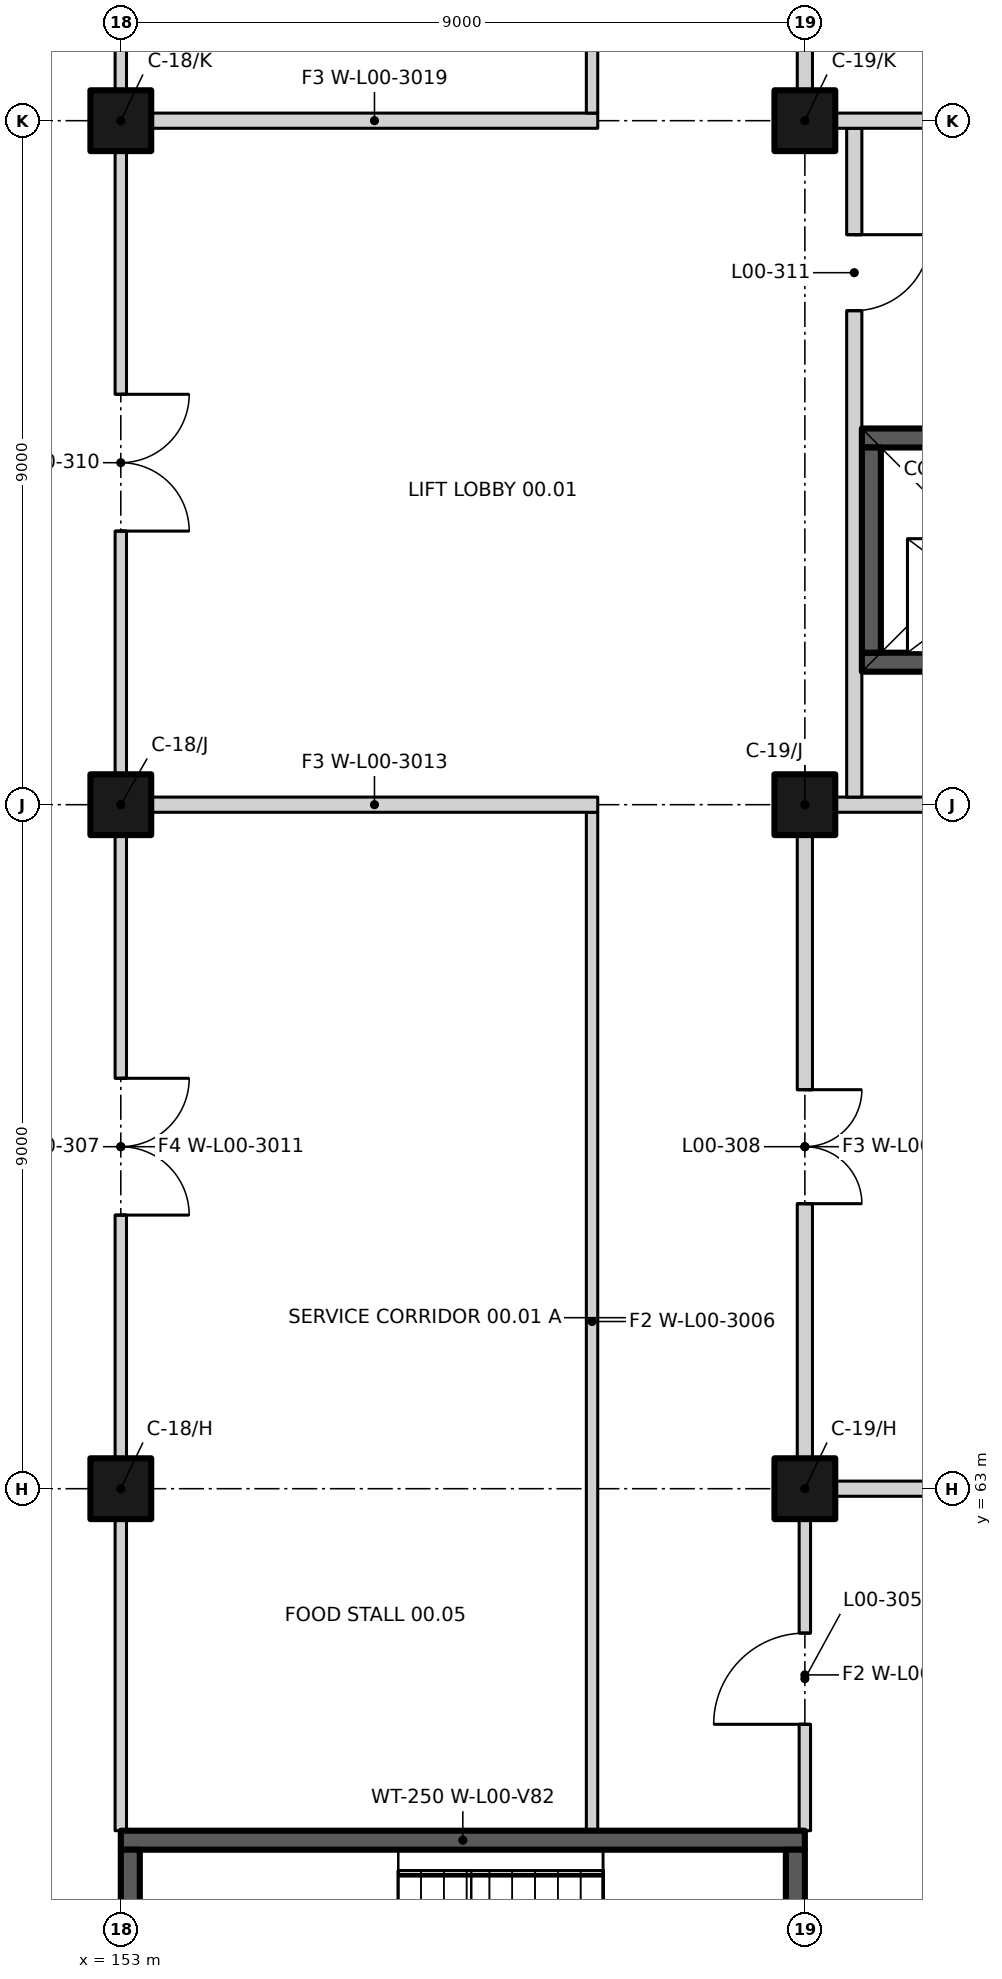
"""IFC4 building model, lengths in metres.
Left out: names, types, materials, properties, quantities, classifications, styles, units other than length and angle.
Written with IfcOpenShell. Run it as: python <this file> out.ifc"""

import sys

from ifc_helpers import new_model, si_unit, direction, frame, frame_2d, origin, origin_2d, place, context, subcontext, project, spatial, rectangle, extrude, element, fill, save


model = new_model("IFC4")
c1 = context("Model", 3, precision=1e-05, world=origin(), true_north=direction((0.0, 1.0)))
c2 = subcontext(c1, "Body", "Model", "MODEL_VIEW")
j1 = project(units=[si_unit("LENGTHUNIT", "METRE"), si_unit("PLANEANGLEUNIT", "RADIAN")], contexts=[c1])
p1 = place(None, origin())
s1 = spatial("IfcSite", under=j1, at=p1, CompositionType="ELEMENT")
p2 = place(p1, origin())
s2 = spatial("IfcBuilding", under=s1, at=p2, CompositionType="ELEMENT")
p3 = place(p2, origin())
s3 = spatial("IfcBuildingStorey", under=s2, at=p3, CompositionType="ELEMENT", Elevation=0.0)
for number, where, z_axis, x_axis in (
    (1, (153.0, 63.0, 0.0), (0.0, 0.0, 1.0), (1.0, 0.0, 0.0)),
    (2, (162.0, 63.0, 0.0), (0.0, 0.0, 1.0), (1.0, 0.0, 0.0)),
    (3, (153.0, 72.0, 0.0), (0.0, 0.0, 1.0), (1.0, 0.0, 0.0)),
    (4, (162.0, 72.0, 0.0), (0.0, 0.0, 1.0), (1.0, 0.0, 0.0)),
    (5, (153.0, 81.0, 0.0), (0.0, 0.0, 1.0), (1.0, 0.0, 0.0)),
    (6, (162.0, 81.0, 0.0), (0.0, 0.0, 1.0), (1.0, 0.0, 0.0)),
):
    element("IfcColumn", number, at=place(p3, frame(where, z_axis=z_axis, x_axis=x_axis)), inside=s3, PredefinedType="COLUMN", context=c2, shape_type="SweptSolid", body=[
        extrude(rectangle(XDim=0.8, YDim=0.8, at=origin_2d()), origin(), (0.0, 0.0, 1.0), 6.0),
    ])
p4 = place(p3, frame((153.0, 58.375, 0.0), z_axis=(0.0, 0.0, 1.0), x_axis=(1.0, 0.0, 0.0)))
e7 = element("IfcWall", 7, at=p4, inside=s3, PredefinedType="SHEAR", context=c2, shape_type="SweptSolid", body=[
    extrude(rectangle(XDim=9.0, YDim=0.25, at=frame_2d((4.5, 0.0))), origin(), (0.0, 0.0, 1.0), 6.0),
])
p5 = place(p3, frame((153.125, 56.188, 0.0), z_axis=(0.0, 0.0, 1.0), x_axis=(0.0, 1.0, 0.0)))
e8 = element("IfcWall", 8, at=p5, inside=s3, PredefinedType="SHEAR", context=c2, shape_type="SweptSolid", body=[
    extrude(rectangle(XDim=2.062, YDim=0.25, at=frame_2d((1.031, 0.0))), origin(), (0.0, 0.0, 1.0), 6.0),
])
p6 = place(p3, frame((161.875, 54.4, 0.0), z_axis=(0.0, 0.0, 1.0), x_axis=(0.0, 1.0, 0.0)))
e9 = element("IfcWall", 9, at=p6, inside=s3, PredefinedType="SHEAR", context=c2, shape_type="SweptSolid", body=[
    extrude(rectangle(XDim=3.85, YDim=0.25, at=frame_2d((1.925, 0.0))), origin(), (0.0, 0.0, 1.0), 6.0),
])
p7 = place(p6, frame((0.95, 0.0, 0.0)))
e10 = element("IfcOpeningElement", 10, at=p7, cuts=e9, PredefinedType="OPENING", context=c2, shape_type="SweptSolid", body=[
    extrude(rectangle(XDim=1.8, YDim=2.1, at=frame_2d((0.9, 1.05))), frame((0.0, 0.135, 0.0), z_axis=(0.0, -1.0, 0.0), x_axis=(1.0, 0.0, 0.0)), (0.0, 0.0, 1.0), 0.27),
])
p8 = place(p3, frame((162.75, 73.875, -1.6), z_axis=(0.0, 0.0, 1.0), x_axis=(1.0, 0.0, 0.0)))
e11 = element("IfcWall", 11, at=p8, inside=s3, PredefinedType="SHEAR", context=c2, shape_type="SweptSolid", body=[
    extrude(rectangle(XDim=3.2, YDim=0.25, at=frame_2d((1.6, 0.0))), origin(), (0.0, 0.0, 1.0), 7.6),
])
p9 = place(p8, frame((1.05, 0.0, 1.6)))
e12 = element("IfcOpeningElement", 12, at=p9, cuts=e11, PredefinedType="OPENING", context=c2, shape_type="SweptSolid", body=[
    extrude(rectangle(XDim=1.1, YDim=2.1, at=frame_2d((0.55, 1.05))), frame((0.0, 0.135, 0.0), z_axis=(0.0, -1.0, 0.0), x_axis=(1.0, 0.0, 0.0)), (0.0, 0.0, 1.0), 0.27),
])
p10 = place(p3, frame((162.75, 76.825, -1.6), z_axis=(0.0, 0.0, 1.0), x_axis=(1.0, 0.0, 0.0)))
e13 = element("IfcWall", 13, at=p10, inside=s3, PredefinedType="SHEAR", context=c2, shape_type="SweptSolid", body=[
    extrude(rectangle(XDim=3.2, YDim=0.25, at=frame_2d((1.6, 0.0))), origin(), (0.0, 0.0, 1.0), 7.6),
])
p11 = place(p3, frame((162.875, 74.0, -1.6), z_axis=(0.0, 0.0, 1.0), x_axis=(0.0, 1.0, 0.0)))
e14 = element("IfcWall", 14, at=p11, inside=s3, PredefinedType="SHEAR", context=c2, shape_type="SweptSolid", body=[
    extrude(rectangle(XDim=2.7, YDim=0.25, at=frame_2d((1.35, 0.0))), origin(), (0.0, 0.0, 1.0), 7.6),
])
p12 = place(p3, frame((153.0, 58.5, 0.0), z_axis=(0.0, 0.0, 1.0), x_axis=(0.0, 1.0, 0.0)))
e15 = element("IfcWall", 15, at=p12, inside=s3, PredefinedType="PARTITIONING", context=c2, shape_type="SweptSolid", body=[
    extrude(rectangle(XDim=4.1, YDim=0.15, at=frame_2d((2.05, 0.0))), origin(), (0.0, 0.0, 1.0), 5.7),
])
p13 = place(p3, frame((159.2, 58.5, 0.0), z_axis=(0.0, 0.0, 1.0), x_axis=(0.0, 1.0, 0.0)))
e16 = element("IfcWall", 16, at=p13, inside=s3, PredefinedType="PARTITIONING", context=c2, shape_type="SweptSolid", body=[
    extrude(rectangle(XDim=13.4, YDim=0.15, at=frame_2d((6.7, 0.0))), origin(), (0.0, 0.0, 1.0), 5.7),
])
p14 = place(p3, frame((162.0, 58.5, 0.0), z_axis=(0.0, 0.0, 1.0), x_axis=(0.0, 1.0, 0.0)))
e17 = element("IfcWall", 17, at=p14, inside=s3, PredefinedType="PARTITIONING", context=c2, shape_type="SweptSolid", body=[
    extrude(rectangle(XDim=4.1, YDim=0.15, at=frame_2d((2.05, 0.0))), origin(), (0.0, 0.0, 1.0), 5.7),
])
p15 = place(p14, frame((1.4, 0.0, 0.0)))
e18 = element("IfcOpeningElement", 18, at=p15, cuts=e17, PredefinedType="OPENING", context=c2, shape_type="SweptSolid", body=[
    extrude(rectangle(XDim=1.2, YDim=2.1, at=frame_2d((0.6, 1.05))), frame((0.0, 0.085, 0.0), z_axis=(0.0, -1.0, 0.0), x_axis=(1.0, 0.0, 0.0)), (0.0, 0.0, 1.0), 0.17),
])
p16 = place(p3, frame((162.4, 63.0, 0.0), z_axis=(0.0, 0.0, 1.0), x_axis=(1.0, 0.0, 0.0)))
e19 = element("IfcWall", 19, at=p16, inside=s3, PredefinedType="PARTITIONING", context=c2, shape_type="SweptSolid", body=[
    extrude(rectangle(XDim=8.2, YDim=0.2, at=frame_2d((4.1, 0.0))), origin(), (0.0, 0.0, 1.0), 5.7),
])
p17 = place(p3, frame((153.0, 63.4, 0.0), z_axis=(0.0, 0.0, 1.0), x_axis=(0.0, 1.0, 0.0)))
e20 = element("IfcWall", 20, at=p17, inside=s3, PredefinedType="PARTITIONING", context=c2, shape_type="SweptSolid", body=[
    extrude(rectangle(XDim=8.2, YDim=0.15, at=frame_2d((4.1, 0.0))), origin(), (0.0, 0.0, 1.0), 5.2),
])
p18 = place(p17, frame((5.0, 0.0, 0.0), z_axis=(0.0, 0.0, 1.0), x_axis=(-1.0, 0.0, 0.0)))
e21 = element("IfcOpeningElement", 21, at=p18, cuts=e20, PredefinedType="OPENING", context=c2, shape_type="SweptSolid", body=[
    extrude(rectangle(XDim=1.8, YDim=2.1, at=frame_2d((0.9, 1.05))), frame((0.0, 0.085, 0.0), z_axis=(0.0, -1.0, 0.0), x_axis=(1.0, 0.0, 0.0)), (0.0, 0.0, 1.0), 0.17),
])
p19 = place(p3, frame((162.0, 63.4, 0.0), z_axis=(0.0, 0.0, 1.0), x_axis=(0.0, 1.0, 0.0)))
e22 = element("IfcWall", 22, at=p19, inside=s3, PredefinedType="PARTITIONING", context=c2, shape_type="SweptSolid", body=[
    extrude(rectangle(XDim=8.2, YDim=0.2, at=frame_2d((4.1, 0.0))), origin(), (0.0, 0.0, 1.0), 5.7),
])
p20 = place(p19, frame((4.85, 0.0, 0.0), z_axis=(0.0, 0.0, 1.0), x_axis=(-1.0, 0.0, 0.0)))
e23 = element("IfcOpeningElement", 23, at=p20, cuts=e22, PredefinedType="OPENING", context=c2, shape_type="SweptSolid", body=[
    extrude(rectangle(XDim=1.5, YDim=2.4, at=frame_2d((0.75, 1.2))), frame((0.0, 0.11, 0.0), z_axis=(0.0, -1.0, 0.0), x_axis=(1.0, 0.0, 0.0)), (0.0, 0.0, 1.0), 0.22),
])
p21 = place(p3, frame((153.4, 72.0, 0.0), z_axis=(0.0, 0.0, 1.0), x_axis=(1.0, 0.0, 0.0)))
e24 = element("IfcWall", 24, at=p21, inside=s3, PredefinedType="PARTITIONING", context=c2, shape_type="SweptSolid", body=[
    extrude(rectangle(XDim=5.875, YDim=0.2, at=frame_2d((2.938, 0.0))), origin(), (0.0, 0.0, 1.0), 5.7),
])
p22 = place(p3, frame((162.4, 72.0, 0.0), z_axis=(0.0, 0.0, 1.0), x_axis=(1.0, 0.0, 0.0)))
e25 = element("IfcWall", 25, at=p22, inside=s3, PredefinedType="PARTITIONING", context=c2, shape_type="SweptSolid", body=[
    extrude(rectangle(XDim=8.2, YDim=0.2, at=frame_2d((4.1, 0.0))), origin(), (0.0, 0.0, 1.0), 5.2),
])
p23 = place(p3, frame((162.65, 72.1, 0.0), z_axis=(0.0, 0.0, 1.0), x_axis=(0.0, 1.0, 0.0)))
e26 = element("IfcWall", 26, at=p23, inside=s3, PredefinedType="PARTITIONING", context=c2, shape_type="SweptSolid", body=[
    extrude(rectangle(XDim=8.8, YDim=0.2, at=frame_2d((4.4, 0.0))), origin(), (0.0, 0.0, 1.0), 5.2),
])
p24 = place(p23, frame((7.4, 0.0, 0.0), z_axis=(0.0, 0.0, 1.0), x_axis=(-1.0, 0.0, 0.0)))
e27 = element("IfcOpeningElement", 27, at=p24, cuts=e26, PredefinedType="OPENING", context=c2, shape_type="SweptSolid", body=[
    extrude(rectangle(XDim=1.0, YDim=2.1, at=frame_2d((0.5, 1.05))), frame((0.0, 0.11, 0.0), z_axis=(0.0, -1.0, 0.0), x_axis=(1.0, 0.0, 0.0)), (0.0, 0.0, 1.0), 0.22),
])
p25 = place(p3, frame((153.0, 72.4, 0.0), z_axis=(0.0, 0.0, 1.0), x_axis=(0.0, 1.0, 0.0)))
e28 = element("IfcWall", 28, at=p25, inside=s3, PredefinedType="PARTITIONING", context=c2, shape_type="SweptSolid", body=[
    extrude(rectangle(XDim=8.2, YDim=0.15, at=frame_2d((4.1, 0.0))), origin(), (0.0, 0.0, 1.0), 5.2),
])
p26 = place(p25, frame((5.0, 0.0, 0.0), z_axis=(0.0, 0.0, 1.0), x_axis=(-1.0, 0.0, 0.0)))
e29 = element("IfcOpeningElement", 29, at=p26, cuts=e28, PredefinedType="OPENING", context=c2, shape_type="SweptSolid", body=[
    extrude(rectangle(XDim=1.8, YDim=2.1, at=frame_2d((0.9, 1.05))), frame((0.0, 0.085, 0.0), z_axis=(0.0, -1.0, 0.0), x_axis=(1.0, 0.0, 0.0)), (0.0, 0.0, 1.0), 0.17),
])
p27 = place(p3, frame((153.4, 81.0, 0.0), z_axis=(0.0, 0.0, 1.0), x_axis=(1.0, 0.0, 0.0)))
e30 = element("IfcWall", 30, at=p27, inside=s3, PredefinedType="PARTITIONING", context=c2, shape_type="SweptSolid", body=[
    extrude(rectangle(XDim=5.875, YDim=0.2, at=frame_2d((2.938, 0.0))), origin(), (0.0, 0.0, 1.0), 5.7),
])
p28 = place(p3, frame((162.4, 81.0, 0.0), z_axis=(0.0, 0.0, 1.0), x_axis=(1.0, 0.0, 0.0)))
e31 = element("IfcWall", 31, at=p28, inside=s3, PredefinedType="PARTITIONING", context=c2, shape_type="SweptSolid", body=[
    extrude(rectangle(XDim=8.2, YDim=0.2, at=frame_2d((4.1, 0.0))), origin(), (0.0, 0.0, 1.0), 5.2),
])
p29 = place(p3, frame((159.2, 81.1, 0.0), z_axis=(0.0, 0.0, 1.0), x_axis=(0.0, 1.0, 0.0)))
e32 = element("IfcWall", 32, at=p29, inside=s3, PredefinedType="PARTITIONING", context=c2, shape_type="SweptSolid", body=[
    extrude(rectangle(XDim=8.85, YDim=0.15, at=frame_2d((4.425, 0.0))), origin(), (0.0, 0.0, 1.0), 5.7),
])
p30 = place(p3, frame((153.0, 81.4, 0.0), z_axis=(0.0, 0.0, 1.0), x_axis=(0.0, 1.0, 0.0)))
e33 = element("IfcWall", 33, at=p30, inside=s3, PredefinedType="PARTITIONING", context=c2, shape_type="SweptSolid", body=[
    extrude(rectangle(XDim=8.2, YDim=0.15, at=frame_2d((4.1, 0.0))), origin(), (0.0, 0.0, 1.0), 5.2),
])
p31 = place(p30, frame((5.0, 0.0, 0.0), z_axis=(0.0, 0.0, 1.0), x_axis=(-1.0, 0.0, 0.0)))
e34 = element("IfcOpeningElement", 34, at=p31, cuts=e33, PredefinedType="OPENING", context=c2, shape_type="SweptSolid", body=[
    extrude(rectangle(XDim=1.8, YDim=2.1, at=frame_2d((0.9, 1.05))), frame((0.0, 0.085, 0.0), z_axis=(0.0, -1.0, 0.0), x_axis=(1.0, 0.0, 0.0)), (0.0, 0.0, 1.0), 0.17),
])
p32 = place(p3, frame((162.0, 81.4, 0.0), z_axis=(0.0, 0.0, 1.0), x_axis=(0.0, 1.0, 0.0)))
e35 = element("IfcWall", 35, at=p32, inside=s3, PredefinedType="PARTITIONING", context=c2, shape_type="SweptSolid", body=[
    extrude(rectangle(XDim=8.2, YDim=0.2, at=frame_2d((4.1, 0.0))), origin(), (0.0, 0.0, 1.0), 5.7),
])
p33 = place(p32, frame((4.85, 0.0, 0.0), z_axis=(0.0, 0.0, 1.0), x_axis=(-1.0, 0.0, 0.0)))
e36 = element("IfcOpeningElement", 36, at=p33, cuts=e35, PredefinedType="OPENING", context=c2, shape_type="SweptSolid", body=[
    extrude(rectangle(XDim=1.5, YDim=2.4, at=frame_2d((0.75, 1.2))), frame((0.0, 0.11, 0.0), z_axis=(0.0, -1.0, 0.0), x_axis=(1.0, 0.0, 0.0)), (0.0, 0.0, 1.0), 0.22),
])
p34 = place(p15, origin())
e37 = element("IfcDoor", 37, at=p34, inside=s3, OperationType="SINGLE_SWING_LEFT", PredefinedType="DOOR", context=c2, shape_type="SweptSolid", body=[
    extrude(rectangle(XDim=1.2, YDim=2.1, at=frame_2d((0.6, 1.05))), frame((0.0, 0.025, 0.0), z_axis=(0.0, -1.0, 0.0), x_axis=(1.0, 0.0, 0.0)), (0.0, 0.0, 1.0), 0.05),
])
fill(e18, e37)
p35 = place(p18, origin())
e38 = element("IfcDoor", 38, at=p35, inside=s3, OperationType="DOUBLE_DOOR_SINGLE_SWING", PredefinedType="DOOR", context=c2, shape_type="SweptSolid", body=[
    extrude(rectangle(XDim=1.8, YDim=2.1, at=frame_2d((0.9, 1.05))), frame((0.0, 0.025, 0.0), z_axis=(0.0, -1.0, 0.0), x_axis=(1.0, 0.0, 0.0)), (0.0, 0.0, 1.0), 0.05),
])
fill(e21, e38)
p36 = place(p20, origin())
e39 = element("IfcDoor", 39, at=p36, inside=s3, OperationType="DOUBLE_DOOR_SINGLE_SWING", PredefinedType="DOOR", context=c2, shape_type="SweptSolid", body=[
    extrude(rectangle(XDim=1.5, YDim=2.4, at=frame_2d((0.75, 1.2))), frame((0.0, 0.025, 0.0), z_axis=(0.0, -1.0, 0.0), x_axis=(1.0, 0.0, 0.0)), (0.0, 0.0, 1.0), 0.05),
])
fill(e23, e39)
p37 = place(p26, origin())
e40 = element("IfcDoor", 40, at=p37, inside=s3, OperationType="DOUBLE_DOOR_SINGLE_SWING", PredefinedType="DOOR", context=c2, shape_type="SweptSolid", body=[
    extrude(rectangle(XDim=1.8, YDim=2.1, at=frame_2d((0.9, 1.05))), frame((0.0, 0.025, 0.0), z_axis=(0.0, -1.0, 0.0), x_axis=(1.0, 0.0, 0.0)), (0.0, 0.0, 1.0), 0.05),
])
fill(e29, e40)
p38 = place(p24, origin())
e41 = element("IfcDoor", 41, at=p38, inside=s3, OperationType="SINGLE_SWING_LEFT", PredefinedType="DOOR", context=c2, shape_type="SweptSolid", body=[
    extrude(rectangle(XDim=1.0, YDim=2.1, at=frame_2d((0.5, 1.05))), frame((0.0, 0.025, 0.0), z_axis=(0.0, -1.0, 0.0), x_axis=(1.0, 0.0, 0.0)), (0.0, 0.0, 1.0), 0.05),
])
fill(e27, e41)
save(model, sys.argv[1])
